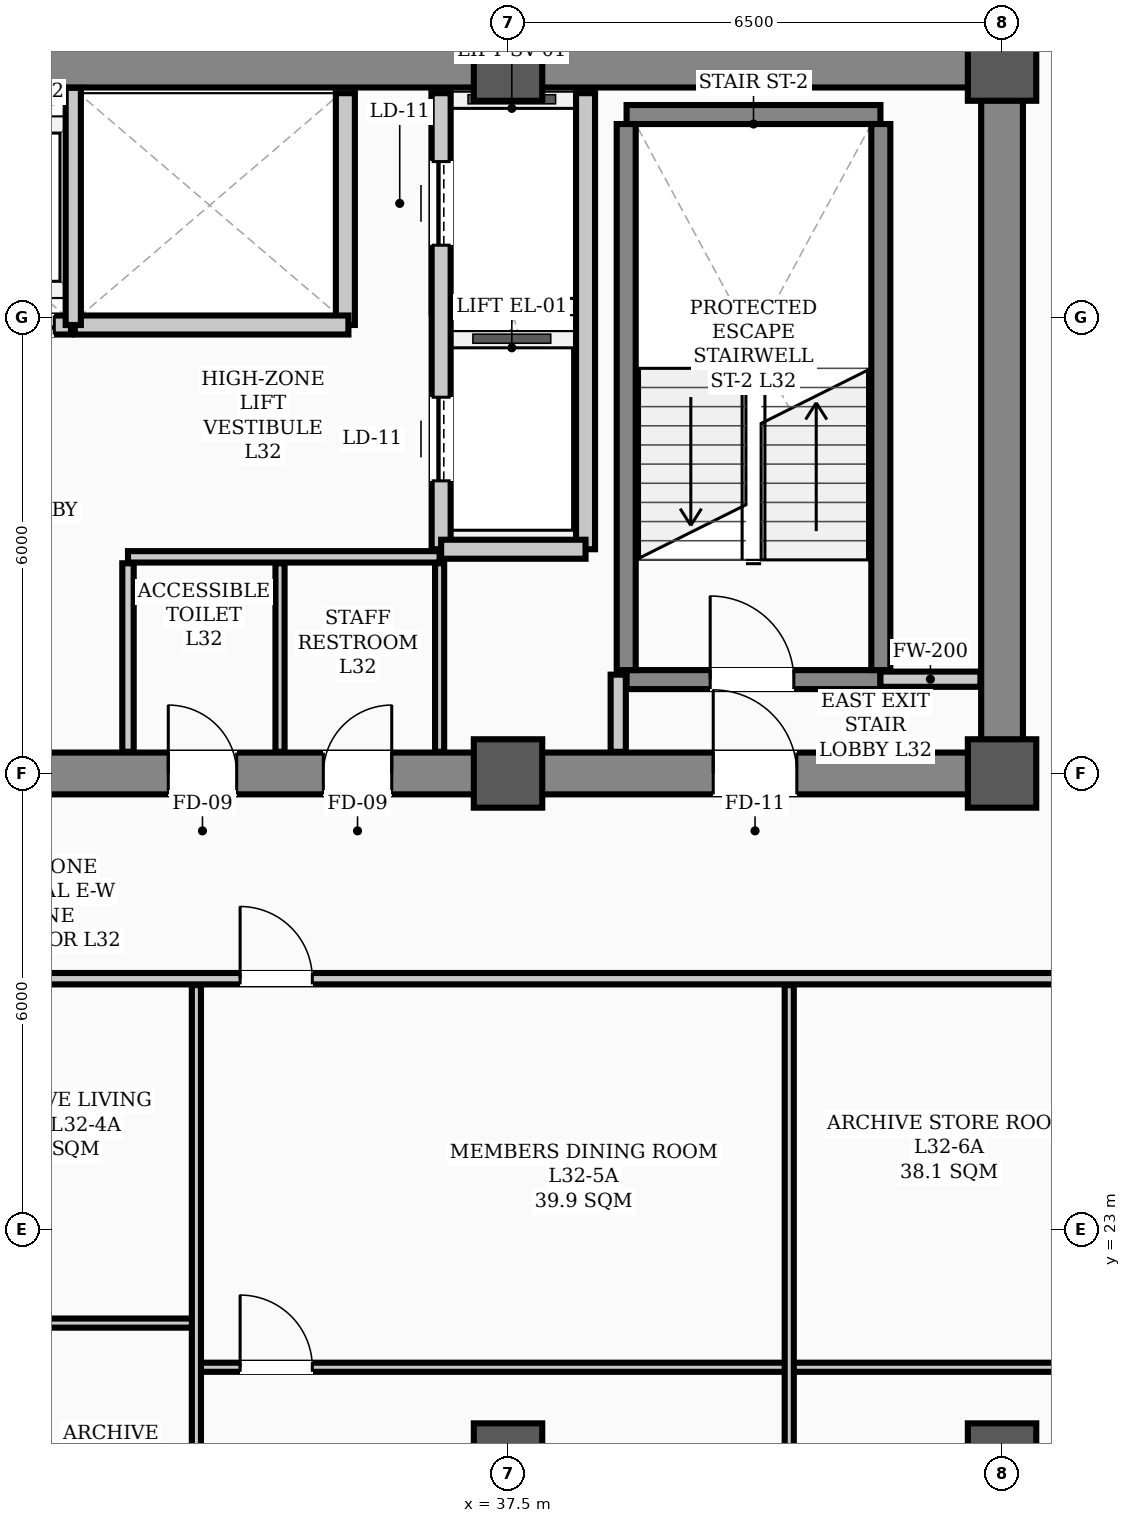
"""IFC4 building model, lengths in metres.
Left out: names, types, materials, properties, quantities, classifications, styles, units other than length and angle.
Written with IfcOpenShell. Run it as: python <this file> out.ifc"""

import sys

from ifc_helpers import new_model, si_unit, direction, frame, frame_2d, origin, origin_2d, place, context, subcontext, project, spatial, rectangle, hollow_rectangle, extrude, element, fill, save


model = new_model("IFC4")
c1 = context("Model", 3, precision=1e-05, world=origin(), true_north=direction((0.0, 1.0)))
c2 = subcontext(c1, "Body", "Model", "MODEL_VIEW")
j1 = project(units=[si_unit("LENGTHUNIT", "METRE"), si_unit("PLANEANGLEUNIT", "RADIAN")], contexts=[c1])
p1 = place(None, origin())
s1 = spatial("IfcSite", under=j1, at=p1, CompositionType="ELEMENT")
p2 = place(p1, origin())
s2 = spatial("IfcBuilding", under=s1, at=p2, CompositionType="ELEMENT")
p3 = place(p2, frame((0.0, 0.0, 130.5)))
s3 = spatial("IfcBuildingStorey", under=s2, at=p3, CompositionType="ELEMENT", Elevation=130.5)
for number, where, z_axis, x_axis in (
    (1, (37.5, 29.0, 0.0), (0.0, 0.0, 1.0), (1.0, 0.0, 0.0)),
    (2, (37.5, 38.3, 0.0), (0.0, 0.0, 1.0), (1.0, 0.0, 0.0)),
    (3, (44.0, 29.0, 0.0), (0.0, 0.0, 1.0), (1.0, 0.0, 0.0)),
    (4, (44.0, 38.3, 0.0), (0.0, 0.0, 1.0), (1.0, 0.0, 0.0)),
    (5, (37.5, 20.0, 0.0), (0.0, 0.0, 1.0), (1.0, 0.0, 0.0)),
    (6, (44.0, 20.0, 0.0), (0.0, 0.0, 1.0), (1.0, 0.0, 0.0)),
):
    element("IfcColumn", number, at=place(p3, frame(where, z_axis=z_axis, x_axis=x_axis)), inside=s3, PredefinedType="COLUMN", context=c2, shape_type="SweptSolid", body=[
        extrude(hollow_rectangle(XDim=0.9, YDim=0.9, WallThickness=0.035, InnerFilletRadius=0.017, OuterFilletRadius=0.052, at=origin_2d()), origin(), (0.0, 0.0, 1.0), 3.9),
    ])
p4 = place(p3, frame((13.5, 29.0, 0.0), z_axis=(0.0, 0.0, 1.0), x_axis=(1.0, 0.0, 0.0)))
e7 = element("IfcWall", 7, at=p4, inside=s3, PredefinedType="SHEAR", context=c2, shape_type="SweptSolid", body=[
    extrude(rectangle(XDim=30.5, YDim=0.55, at=frame_2d((15.25, 0.0))), origin(), (0.0, 0.0, 1.0), 3.72),
])
p5 = place(p4, frame((1.75, 0.0, 0.0)))
e8 = element("IfcOpeningElement", 8, at=p5, cuts=e7, PredefinedType="OPENING", context=c2, shape_type="SweptSolid", body=[
    extrude(rectangle(XDim=1.1, YDim=2.08, at=frame_2d((0.55, 1.04))), frame((0.0, 0.285, 0.0), z_axis=(0.0, -1.0, 0.0), x_axis=(1.0, 0.0, 0.0)), (0.0, 0.0, 1.0), 0.57),
])
p6 = place(p4, frame((26.7, 0.0, 0.0)))
e9 = element("IfcOpeningElement", 9, at=p6, cuts=e7, PredefinedType="OPENING", context=c2, shape_type="SweptSolid", body=[
    extrude(rectangle(XDim=1.1, YDim=2.08, at=frame_2d((0.55, 1.04))), frame((0.0, 0.285, 0.0), z_axis=(0.0, -1.0, 0.0), x_axis=(1.0, 0.0, 0.0)), (0.0, 0.0, 1.0), 0.57),
])
p7 = place(p4, frame((6.8, 0.0, 0.0)))
e10 = element("IfcOpeningElement", 10, at=p7, cuts=e7, PredefinedType="OPENING", context=c2, shape_type="SweptSolid", body=[
    extrude(rectangle(XDim=1.1, YDim=2.08, at=frame_2d((0.55, 1.04))), frame((0.0, 0.285, 0.0), z_axis=(0.0, -1.0, 0.0), x_axis=(1.0, 0.0, 0.0)), (0.0, 0.0, 1.0), 0.57),
])
p8 = place(p4, frame((13.2, 0.0, 0.0)))
e11 = element("IfcOpeningElement", 11, at=p8, cuts=e7, PredefinedType="OPENING", context=c2, shape_type="SweptSolid", body=[
    extrude(rectangle(XDim=1.6, YDim=2.08, at=frame_2d((0.8, 1.04))), frame((0.0, 0.285, 0.0), z_axis=(0.0, -1.0, 0.0), x_axis=(1.0, 0.0, 0.0)), (0.0, 0.0, 1.0), 0.57),
])
p9 = place(p4, frame((19.53, 0.0, 0.0)))
e12 = element("IfcOpeningElement", 12, at=p9, cuts=e7, PredefinedType="OPENING", context=c2, shape_type="SweptSolid", body=[
    extrude(rectangle(XDim=0.9, YDim=2.08, at=frame_2d((0.45, 1.04))), frame((0.0, 0.285, 0.0), z_axis=(0.0, -1.0, 0.0), x_axis=(1.0, 0.0, 0.0)), (0.0, 0.0, 1.0), 0.57),
])
p10 = place(p4, frame((21.57, 0.0, 0.0)))
e13 = element("IfcOpeningElement", 13, at=p10, cuts=e7, PredefinedType="OPENING", context=c2, shape_type="SweptSolid", body=[
    extrude(rectangle(XDim=0.9, YDim=2.08, at=frame_2d((0.45, 1.04))), frame((0.0, 0.285, 0.0), z_axis=(0.0, -1.0, 0.0), x_axis=(1.0, 0.0, 0.0)), (0.0, 0.0, 1.0), 0.57),
])
p11 = place(p3, frame((13.5, 38.3, 0.0), z_axis=(0.0, 0.0, 1.0), x_axis=(1.0, 0.0, 0.0)))
e14 = element("IfcWall", 14, at=p11, inside=s3, PredefinedType="SHEAR", context=c2, shape_type="SweptSolid", body=[
    extrude(rectangle(XDim=30.5, YDim=0.55, at=frame_2d((15.25, 0.0))), origin(), (0.0, 0.0, 1.0), 3.72),
])
p12 = place(p3, frame((44.0, 29.35, 0.0), z_axis=(0.0, 0.0, 1.0), x_axis=(0.0, 1.0, 0.0)))
e15 = element("IfcWall", 15, at=p12, inside=s3, PredefinedType="SHEAR", context=c2, shape_type="SweptSolid", body=[
    extrude(rectangle(XDim=8.6, YDim=0.55, at=frame_2d((4.3, 0.0))), origin(), (0.0, 0.0, 1.0), 3.72),
])
p13 = place(p3, frame((39.06, 30.235, 0.0), z_axis=(0.0, 0.0, 1.0), x_axis=(1.0, 0.0, 0.0)))
e16 = element("IfcWall", 16, at=p13, inside=s3, PredefinedType="STANDARD", context=c2, shape_type="SweptSolid", body=[
    extrude(rectangle(XDim=3.34, YDim=0.25, at=frame_2d((1.67, 0.0))), origin(), (0.0, 0.0, 1.0), 3.72),
])
p14 = place(p13, frame((1.1, 0.0, 0.0)))
e17 = element("IfcOpeningElement", 17, at=p14, cuts=e16, PredefinedType="OPENING", context=c2, shape_type="SweptSolid", body=[
    extrude(rectangle(XDim=1.1, YDim=2.08, at=frame_2d((0.55, 1.04))), frame((0.0, 0.135, 0.0), z_axis=(0.0, -1.0, 0.0), x_axis=(1.0, 0.0, 0.0)), (0.0, 0.0, 1.0), 0.27),
])
p15 = place(p3, frame((39.06, 37.669, 0.0), z_axis=(0.0, 0.0, 1.0), x_axis=(1.0, 0.0, 0.0)))
e18 = element("IfcWall", 18, at=p15, inside=s3, PredefinedType="STANDARD", context=c2, shape_type="SweptSolid", body=[
    extrude(rectangle(XDim=3.34, YDim=0.25, at=frame_2d((1.67, 0.0))), origin(), (0.0, 0.0, 1.0), 3.72),
])
for number, where, z_axis, x_axis in (
    (19, (39.055, 30.36, 0.0), (0.0, 0.0, 1.0), (0.0, 1.0, 0.0)),
    (20, (42.405, 30.36, 0.0), (0.0, 0.0, 1.0), (0.0, 1.0, 0.0)),
):
    element("IfcWall", number, at=place(p3, frame(where, z_axis=z_axis, x_axis=x_axis)), inside=s3, PredefinedType="STANDARD", context=c2, shape_type="SweptSolid", body=[
        extrude(rectangle(XDim=7.184, YDim=0.25, at=frame_2d((3.592, 0.0))), origin(), (0.0, 0.0, 1.0), 3.72),
    ])
p16 = place(p3, frame((36.62, 31.95, 0.0), z_axis=(0.0, 0.0, 1.0), x_axis=(0.0, 1.0, 0.0)))
e21 = element("IfcWall", 21, at=p16, inside=s3, PredefinedType="STANDARD", context=c2, shape_type="SweptSolid", body=[
    extrude(rectangle(XDim=6.0, YDim=0.25, at=frame_2d((3.0, 0.0))), origin(), (0.0, 0.0, 1.0), 3.72),
])
p17 = place(p16, frame((0.9, 0.0, 0.0)))
e22 = element("IfcOpeningElement", 22, at=p17, cuts=e21, PredefinedType="OPENING", context=c2, shape_type="SweptSolid", body=[
    extrude(rectangle(XDim=1.1, YDim=2.08, at=frame_2d((0.55, 1.04))), frame((0.0, 0.135, 0.0), z_axis=(0.0, -1.0, 0.0), x_axis=(1.0, 0.0, 0.0)), (0.0, 0.0, 1.0), 0.27),
])
p18 = place(p16, frame((4.0, 0.0, 0.0)))
e23 = element("IfcOpeningElement", 23, at=p18, cuts=e21, PredefinedType="OPENING", context=c2, shape_type="SweptSolid", body=[
    extrude(rectangle(XDim=1.1, YDim=2.08, at=frame_2d((0.55, 1.04))), frame((0.0, 0.135, 0.0), z_axis=(0.0, -1.0, 0.0), x_axis=(1.0, 0.0, 0.0)), (0.0, 0.0, 1.0), 0.27),
])
p19 = place(p3, frame((38.52, 31.95, 0.0), z_axis=(0.0, 0.0, 1.0), x_axis=(0.0, 1.0, 0.0)))
e24 = element("IfcWall", 24, at=p19, inside=s3, PredefinedType="STANDARD", context=c2, shape_type="SweptSolid", body=[
    extrude(rectangle(XDim=6.0, YDim=0.25, at=frame_2d((3.0, 0.0))), origin(), (0.0, 0.0, 1.0), 3.48),
])
p20 = place(p3, frame((36.62, 31.95, 0.0), z_axis=(0.0, 0.0, 1.0), x_axis=(1.0, 0.0, 0.0)))
e25 = element("IfcWall", 25, at=p20, inside=s3, PredefinedType="STANDARD", context=c2, shape_type="SweptSolid", body=[
    extrude(rectangle(XDim=1.9, YDim=0.25, at=frame_2d((0.95, 0.0))), origin(), (0.0, 0.0, 1.0), 3.48),
])
p21 = place(p3, frame((35.36, 34.9, 0.0), z_axis=(0.0, 0.0, 1.0), x_axis=(0.0, 1.0, 0.0)))
e26 = element("IfcWall", 26, at=p21, inside=s3, PredefinedType="STANDARD", context=c2, shape_type="SweptSolid", body=[
    extrude(rectangle(XDim=3.05, YDim=0.25, at=frame_2d((1.525, 0.0))), origin(), (0.0, 0.0, 1.0), 3.72),
])
p22 = place(p3, frame((28.2, 34.9, 0.0), z_axis=(0.0, 0.0, 1.0), x_axis=(1.0, 0.0, 0.0)))
e27 = element("IfcWall", 27, at=p22, inside=s3, PredefinedType="STANDARD", context=c2, shape_type="SweptSolid", body=[
    extrude(rectangle(XDim=3.55, YDim=0.25, at=frame_2d((1.775, 0.0))), origin(), (0.0, 0.0, 1.0), 3.72),
])
p23 = place(p22, frame((0.23, 0.0, 0.0)))
e28 = element("IfcOpeningElement", 28, at=p23, cuts=e27, PredefinedType="OPENING", context=c2, shape_type="SweptSolid", body=[
    extrude(rectangle(XDim=1.3, YDim=2.08, at=frame_2d((0.65, 1.04))), frame((0.0, 0.135, 0.0), z_axis=(0.0, -1.0, 0.0), x_axis=(1.0, 0.0, 0.0)), (0.0, 0.0, 1.0), 0.27),
])
p24 = place(p22, frame((2.03, 0.0, 0.0)))
e29 = element("IfcOpeningElement", 29, at=p24, cuts=e27, PredefinedType="OPENING", context=c2, shape_type="SweptSolid", body=[
    extrude(rectangle(XDim=1.3, YDim=2.08, at=frame_2d((0.65, 1.04))), frame((0.0, 0.135, 0.0), z_axis=(0.0, -1.0, 0.0), x_axis=(1.0, 0.0, 0.0)), (0.0, 0.0, 1.0), 0.27),
])
p25 = place(p3, frame((31.8, 34.9, 0.0), z_axis=(0.0, 0.0, 1.0), x_axis=(1.0, 0.0, 0.0)))
e30 = element("IfcWall", 30, at=p25, inside=s3, PredefinedType="STANDARD", context=c2, shape_type="SweptSolid", body=[
    extrude(rectangle(XDim=3.6, YDim=0.25, at=frame_2d((1.8, 0.0))), origin(), (0.0, 0.0, 1.0), 3.72),
])
p26 = place(p3, frame((42.4, 30.24, 0.0), z_axis=(0.0, 0.0, 1.0), x_axis=(1.0, 0.0, 0.0)))
e31 = element("IfcWall", 31, at=p26, inside=s3, PredefinedType="STANDARD", context=c2, shape_type="SweptSolid", body=[
    extrude(rectangle(XDim=1.315, YDim=0.2, at=frame_2d((0.658, 0.0))), origin(), (0.0, 0.0, 1.0), 3.1),
])
p27 = place(p3, frame((32.5, 31.85, 0.0), z_axis=(0.0, 0.0, 1.0), x_axis=(1.0, 0.0, 0.0)))
e32 = element("IfcWall", 32, at=p27, inside=s3, PredefinedType="PARTITIONING", context=c2, shape_type="SweptSolid", body=[
    extrude(rectangle(XDim=4.1, YDim=0.15, at=frame_2d((2.05, 0.0))), origin(), (0.0, 0.0, 1.0), 3.72),
])
p28 = place(p3, frame((2.31, 26.3, 0.0), z_axis=(0.0, 0.0, 1.0), x_axis=(1.0, 0.0, 0.0)))
e33 = element("IfcWall", 33, at=p28, inside=s3, PredefinedType="PARTITIONING", context=c2, shape_type="SweptSolid", body=[
    extrude(rectangle(XDim=46.38, YDim=0.15, at=frame_2d((23.19, 0.0))), origin(), (0.0, 0.0, 1.0), 3.1),
])
p29 = place(p28, frame((12.515, 0.0, 0.0)))
e34 = element("IfcOpeningElement", 34, at=p29, cuts=e33, PredefinedType="OPENING", context=c2, shape_type="SweptSolid", body=[
    extrude(rectangle(XDim=0.95, YDim=2.08, at=frame_2d((0.475, 1.04))), frame((0.0, 0.085, 0.0), z_axis=(0.0, -1.0, 0.0), x_axis=(1.0, 0.0, 0.0)), (0.0, 0.0, 1.0), 0.17),
])
p30 = place(p28, frame((18.615, 0.0, 0.0)))
e35 = element("IfcOpeningElement", 35, at=p30, cuts=e33, PredefinedType="OPENING", context=c2, shape_type="SweptSolid", body=[
    extrude(rectangle(XDim=0.95, YDim=2.08, at=frame_2d((0.475, 1.04))), frame((0.0, 0.085, 0.0), z_axis=(0.0, -1.0, 0.0), x_axis=(1.0, 0.0, 0.0)), (0.0, 0.0, 1.0), 0.17),
])
p31 = place(p28, frame((26.115, 0.0, 0.0)))
e36 = element("IfcOpeningElement", 36, at=p31, cuts=e33, PredefinedType="OPENING", context=c2, shape_type="SweptSolid", body=[
    extrude(rectangle(XDim=0.95, YDim=2.08, at=frame_2d((0.475, 1.04))), frame((0.0, 0.085, 0.0), z_axis=(0.0, -1.0, 0.0), x_axis=(1.0, 0.0, 0.0)), (0.0, 0.0, 1.0), 0.17),
])
p32 = place(p28, frame((31.665, 0.0, 0.0)))
e37 = element("IfcOpeningElement", 37, at=p32, cuts=e33, PredefinedType="OPENING", context=c2, shape_type="SweptSolid", body=[
    extrude(rectangle(XDim=0.95, YDim=2.08, at=frame_2d((0.475, 1.04))), frame((0.0, 0.085, 0.0), z_axis=(0.0, -1.0, 0.0), x_axis=(1.0, 0.0, 0.0)), (0.0, 0.0, 1.0), 0.17),
])
p33 = place(p28, frame((43.06, 0.0, 0.0)))
e38 = element("IfcOpeningElement", 38, at=p33, cuts=e33, PredefinedType="OPENING", context=c2, shape_type="SweptSolid", body=[
    extrude(rectangle(XDim=0.95, YDim=2.08, at=frame_2d((0.475, 1.04))), frame((0.0, 0.085, 0.0), z_axis=(0.0, -1.0, 0.0), x_axis=(1.0, 0.0, 0.0)), (0.0, 0.0, 1.0), 0.17),
])
p34 = place(p3, frame((24.4, 21.769, 0.0), z_axis=(0.0, 0.0, 1.0), x_axis=(1.0, 0.0, 0.0)))
e39 = element("IfcWall", 39, at=p34, inside=s3, PredefinedType="PARTITIONING", context=c2, shape_type="SweptSolid", body=[
    extrude(rectangle(XDim=9.0, YDim=0.12, at=frame_2d((4.5, 0.0))), origin(), (0.0, 0.0, 1.0), 3.1),
])
p35 = place(p34, frame((4.025, 0.0, 0.0)))
e40 = element("IfcOpeningElement", 40, at=p35, cuts=e39, PredefinedType="OPENING", context=c2, shape_type="SweptSolid", body=[
    extrude(rectangle(XDim=0.95, YDim=2.08, at=frame_2d((0.475, 1.04))), frame((0.0, 0.07, 0.0), z_axis=(0.0, -1.0, 0.0), x_axis=(1.0, 0.0, 0.0)), (0.0, 0.0, 1.0), 0.14),
])
p36 = place(p3, frame((33.4, 21.188, 0.0), z_axis=(0.0, 0.0, 1.0), x_axis=(1.0, 0.0, 0.0)))
e41 = element("IfcWall", 41, at=p36, inside=s3, PredefinedType="PARTITIONING", context=c2, shape_type="SweptSolid", body=[
    extrude(rectangle(XDim=7.8, YDim=0.12, at=frame_2d((3.9, 0.0))), origin(), (0.0, 0.0, 1.0), 3.1),
])
p37 = place(p36, frame((0.575, 0.0, 0.0)))
e42 = element("IfcOpeningElement", 42, at=p37, cuts=e41, PredefinedType="OPENING", context=c2, shape_type="SweptSolid", body=[
    extrude(rectangle(XDim=0.95, YDim=2.08, at=frame_2d((0.475, 1.04))), frame((0.0, 0.07, 0.0), z_axis=(0.0, -1.0, 0.0), x_axis=(1.0, 0.0, 0.0)), (0.0, 0.0, 1.0), 0.14),
])
p38 = place(p3, frame((41.2, 21.188, 0.0), z_axis=(0.0, 0.0, 1.0), x_axis=(1.0, 0.0, 0.0)))
e43 = element("IfcWall", 43, at=p38, inside=s3, PredefinedType="PARTITIONING", context=c2, shape_type="SweptSolid", body=[
    extrude(rectangle(XDim=7.49, YDim=0.12, at=frame_2d((3.745, 0.0))), origin(), (0.0, 0.0, 1.0), 3.1),
])
p39 = place(p38, frame((4.17, 0.0, 0.0)))
e44 = element("IfcOpeningElement", 44, at=p39, cuts=e43, PredefinedType="OPENING", context=c2, shape_type="SweptSolid", body=[
    extrude(rectangle(XDim=0.95, YDim=2.08, at=frame_2d((0.475, 1.04))), frame((0.0, 0.07, 0.0), z_axis=(0.0, -1.0, 0.0), x_axis=(1.0, 0.0, 0.0)), (0.0, 0.0, 1.0), 0.14),
])
p40 = place(p3, frame((38.95, 29.285, 0.0), z_axis=(0.0, 0.0, 1.0), x_axis=(0.0, 1.0, 0.0)))
e45 = element("IfcWall", 45, at=p40, inside=s3, PredefinedType="STANDARD", context=c2, shape_type="SweptSolid", body=[
    extrude(rectangle(XDim=1.015, YDim=0.2, at=frame_2d((0.508, 0.0))), origin(), (0.0, 0.0, 1.0), 3.3),
])
p41 = place(p3, frame((32.5, 29.285, 0.0), z_axis=(0.0, 0.0, 1.0), x_axis=(0.0, 1.0, 0.0)))
e46 = element("IfcWall", 46, at=p41, inside=s3, PredefinedType="PARTITIONING", context=c2, shape_type="SweptSolid", body=[
    extrude(rectangle(XDim=2.48, YDim=0.15, at=frame_2d((1.24, 0.0))), origin(), (0.0, 0.0, 1.0), 3.3),
])
for number, where, z_axis, x_axis in (
    (47, (36.6, 29.285, 0.0), (0.0, 0.0, 1.0), (0.0, 1.0, 0.0)),
    (48, (34.5, 29.285, 0.0), (0.0, 0.0, 1.0), (0.0, 1.0, 0.0)),
):
    element("IfcWall", number, at=place(p3, frame(where, z_axis=z_axis, x_axis=x_axis)), inside=s3, PredefinedType="PARTITIONING", context=c2, shape_type="SweptSolid", body=[
        extrude(rectangle(XDim=2.48, YDim=0.12, at=frame_2d((1.24, 0.0))), origin(), (0.0, 0.0, 1.0), 3.3),
    ])
for number, where, z_axis, x_axis in (
    (49, (33.4, 10.81, 0.0), (0.0, 0.0, 1.0), (0.0, 1.0, 0.0)),
    (50, (41.2, 10.81, 0.0), (0.0, 0.0, 1.0), (0.0, 1.0, 0.0)),
):
    element("IfcWall", number, at=place(p3, frame(where, z_axis=z_axis, x_axis=x_axis)), inside=s3, PredefinedType="PARTITIONING", context=c2, shape_type="SweptSolid", body=[
        extrude(rectangle(XDim=15.405, YDim=0.12, at=frame_2d((7.703, 0.0))), origin(), (0.0, 0.0, 1.0), 3.0),
    ])
p42 = place(p3, frame((31.78, 34.9, 0.0), z_axis=(0.0, 0.0, 1.0), x_axis=(0.0, 1.0, 0.0)))
e51 = element("IfcWall", 51, at=p42, inside=s3, PredefinedType="STANDARD", context=c2, shape_type="SweptSolid", body=[
    extrude(rectangle(XDim=3.12, YDim=0.2, at=frame_2d((1.56, 0.0))), origin(), (0.0, 0.0, 1.0), 3.72),
])
p43 = place(p14, origin())
e52 = element("IfcDoor", 52, at=p43, inside=s3, OperationType="SINGLE_SWING_LEFT", PredefinedType="DOOR", context=c2, shape_type="SweptSolid", body=[
    extrude(rectangle(XDim=1.1, YDim=2.08, at=frame_2d((0.55, 1.04))), frame((0.0, 0.025, 0.0), z_axis=(0.0, -1.0, 0.0), x_axis=(1.0, 0.0, 0.0)), (0.0, 0.0, 1.0), 0.05),
])
fill(e17, e52)
p44 = place(p6, origin())
e53 = element("IfcDoor", 53, at=p44, inside=s3, OperationType="SINGLE_SWING_LEFT", PredefinedType="DOOR", context=c2, shape_type="SweptSolid", body=[
    extrude(rectangle(XDim=1.1, YDim=2.08, at=frame_2d((0.55, 1.04))), frame((0.0, 0.025, 0.0), z_axis=(0.0, -1.0, 0.0), x_axis=(1.0, 0.0, 0.0)), (0.0, 0.0, 1.0), 0.05),
])
fill(e9, e53)
p45 = place(p9, origin())
e54 = element("IfcDoor", 54, at=p45, inside=s3, OperationType="SINGLE_SWING_LEFT", PredefinedType="DOOR", context=c2, shape_type="SweptSolid", body=[
    extrude(rectangle(XDim=0.9, YDim=2.08, at=frame_2d((0.45, 1.04))), frame((0.0, 0.025, 0.0), z_axis=(0.0, -1.0, 0.0), x_axis=(1.0, 0.0, 0.0)), (0.0, 0.0, 1.0), 0.05),
])
fill(e12, e54)
p46 = place(p10, origin())
e55 = element("IfcDoor", 55, at=p46, inside=s3, OperationType="SINGLE_SWING_RIGHT", PredefinedType="DOOR", context=c2, shape_type="SweptSolid", body=[
    extrude(rectangle(XDim=0.9, YDim=2.08, at=frame_2d((0.45, 1.04))), frame((0.0, 0.025, 0.0), z_axis=(0.0, -1.0, 0.0), x_axis=(1.0, 0.0, 0.0)), (0.0, 0.0, 1.0), 0.05),
])
fill(e13, e55)
p47 = place(p37, origin())
e56 = element("IfcDoor", 56, at=p47, inside=s3, OperationType="SINGLE_SWING_LEFT", PredefinedType="DOOR", context=c2, shape_type="SweptSolid", body=[
    extrude(rectangle(XDim=0.95, YDim=2.08, at=frame_2d((0.475, 1.04))), frame((0.0, 0.025, 0.0), z_axis=(0.0, -1.0, 0.0), x_axis=(1.0, 0.0, 0.0)), (0.0, 0.0, 1.0), 0.05),
])
fill(e42, e56)
p48 = place(p32, origin())
e57 = element("IfcDoor", 57, at=p48, inside=s3, OperationType="SINGLE_SWING_LEFT", PredefinedType="DOOR", context=c2, shape_type="SweptSolid", body=[
    extrude(rectangle(XDim=0.95, YDim=2.08, at=frame_2d((0.475, 1.04))), frame((0.0, 0.025, 0.0), z_axis=(0.0, -1.0, 0.0), x_axis=(1.0, 0.0, 0.0)), (0.0, 0.0, 1.0), 0.05),
])
fill(e37, e57)
p49 = place(p17, origin())
e58 = element("IfcDoor", 58, at=p49, inside=s3, OperationType="SLIDING_TO_LEFT", PredefinedType="DOOR", context=c2, shape_type="SweptSolid", body=[
    extrude(rectangle(XDim=1.1, YDim=2.08, at=frame_2d((0.55, 1.04))), frame((0.0, 0.025, 0.0), z_axis=(0.0, -1.0, 0.0), x_axis=(1.0, 0.0, 0.0)), (0.0, 0.0, 1.0), 0.05),
])
fill(e22, e58)
p50 = place(p18, origin())
e59 = element("IfcDoor", 59, at=p50, inside=s3, OperationType="SLIDING_TO_LEFT", PredefinedType="DOOR", context=c2, shape_type="SweptSolid", body=[
    extrude(rectangle(XDim=1.1, YDim=2.08, at=frame_2d((0.55, 1.04))), frame((0.0, 0.025, 0.0), z_axis=(0.0, -1.0, 0.0), x_axis=(1.0, 0.0, 0.0)), (0.0, 0.0, 1.0), 0.05),
])
fill(e23, e59)
p51 = place(p24, origin())
e60 = element("IfcDoor", 60, at=p51, inside=s3, OperationType="DOUBLE_DOOR_SLIDING", PredefinedType="DOOR", context=c2, shape_type="SweptSolid", body=[
    extrude(rectangle(XDim=1.3, YDim=2.08, at=frame_2d((0.65, 1.04))), frame((0.0, 0.025, 0.0), z_axis=(0.0, -1.0, 0.0), x_axis=(1.0, 0.0, 0.0)), (0.0, 0.0, 1.0), 0.05),
])
fill(e29, e60)
save(model, sys.argv[1])
